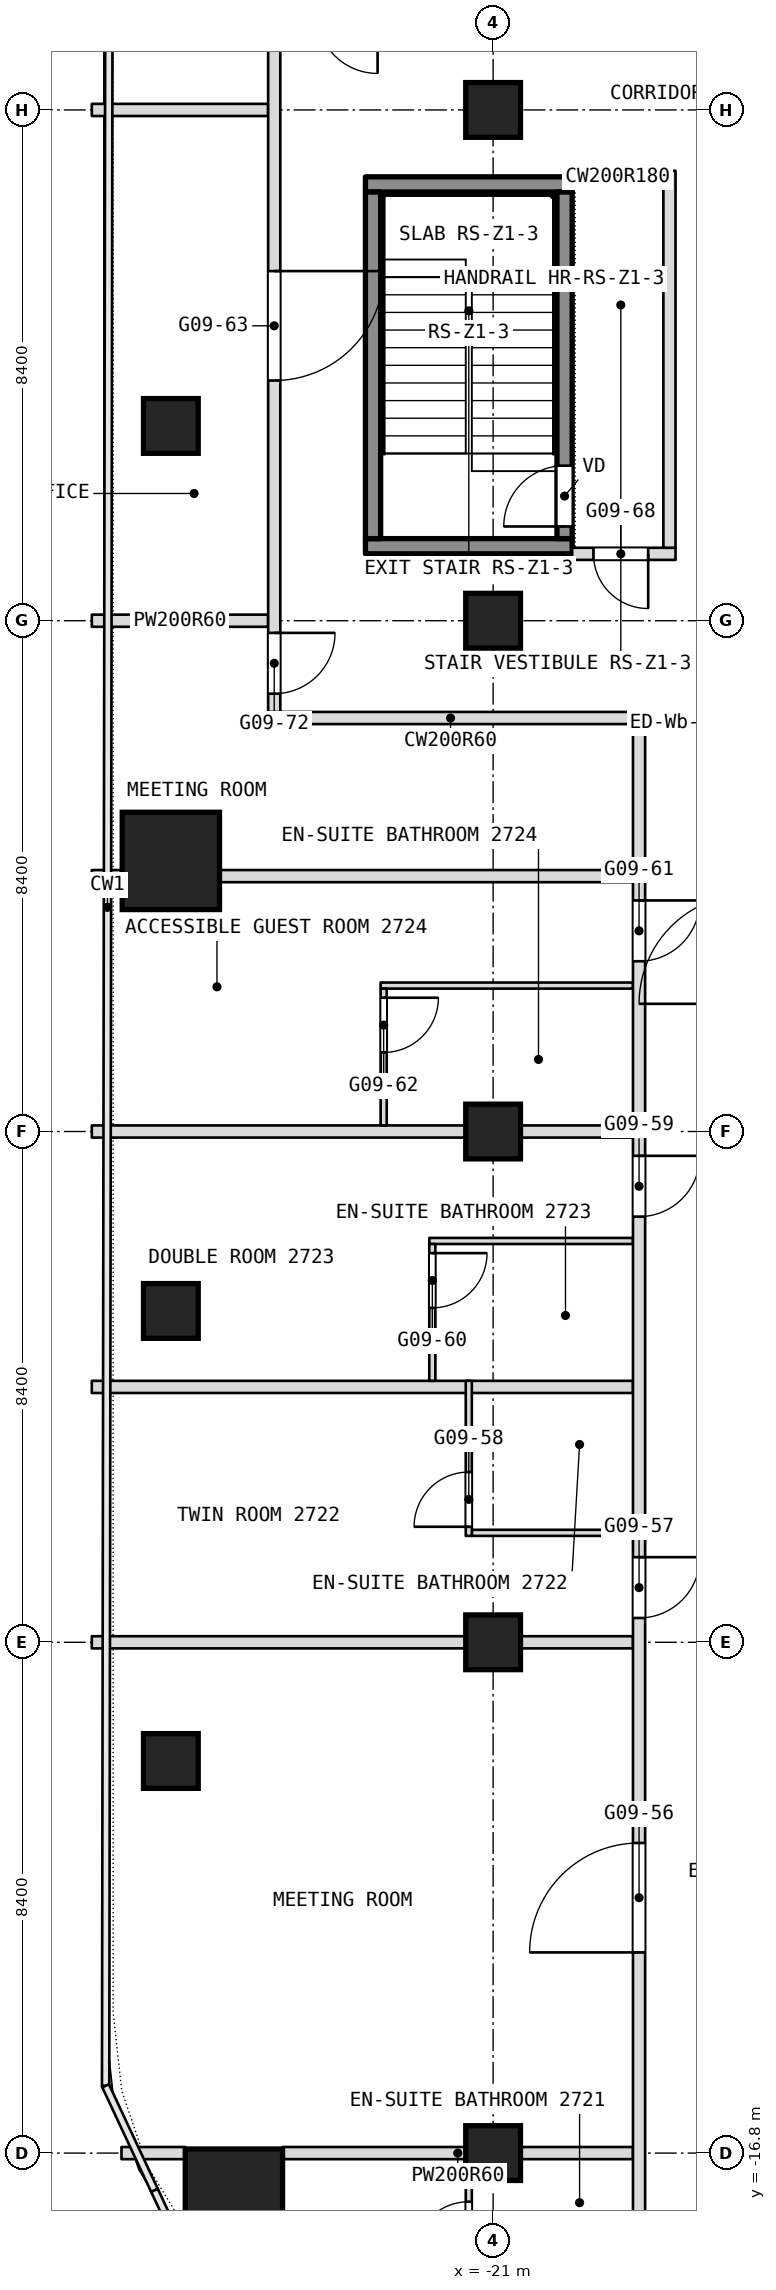
"""IFC4 building model, lengths in metres.
Left out: names, types, materials, properties, quantities, classifications, styles, units other than length and angle.
Written with IfcOpenShell. Run it as: python <this file> out.ifc"""

import sys

from ifc_helpers import new_model, si_unit, direction, frame, frame_2d, origin, origin_2d, place, context, subcontext, project, spatial, rectangle, extrude, element, fill, save


model = new_model("IFC4")
c1 = context("Model", 3, precision=1e-05, world=origin(), true_north=direction((0.0, 1.0)))
c2 = subcontext(c1, "Body", "Model", "MODEL_VIEW")
j1 = project(units=[si_unit("LENGTHUNIT", "METRE"), si_unit("PLANEANGLEUNIT", "RADIAN")], contexts=[c1])
p1 = place(None, origin())
s1 = spatial("IfcSite", under=j1, at=p1, CompositionType="ELEMENT")
p2 = place(p1, origin())
s2 = spatial("IfcBuilding", under=s1, at=p2, CompositionType="ELEMENT")
p3 = place(p2, frame((0.0, 0.0, 122.9)))
s3 = spatial("IfcBuildingStorey", under=s2, at=p3, CompositionType="ELEMENT", Elevation=122.9)
for number, where, z_axis, x_axis in (
    (1, (-25.263, -17.533, 0.0), (0.0, 0.0, 1.0), (1.0, 0.0, 0.0)),
    (2, (-26.3, 4.45, 0.0), (0.0, 0.0, 1.0), (1.0, 0.0, 0.0)),
):
    element("IfcColumn", number, at=place(p3, frame(where, z_axis=z_axis, x_axis=x_axis)), inside=s3, PredefinedType="COLUMN", context=c2, shape_type="SweptSolid", body=[
        extrude(rectangle(XDim=1.6, YDim=1.6, at=origin_2d()), origin(), (0.0, 0.0, 1.0), 3.6),
    ])
for number, where, z_axis, x_axis in (
    (3, (-21.0, -16.8, 0.0), (0.0, 0.0, 1.0), (1.0, 0.0, 0.0)),
    (4, (-21.0, -8.4, 0.0), (0.0, 0.0, 1.0), (1.0, 0.0, 0.0)),
    (5, (-21.0, 0.0, 0.0), (0.0, 0.0, 1.0), (1.0, 0.0, 0.0)),
    (6, (-21.0, 8.4, 0.0), (0.0, 0.0, 1.0), (1.0, 0.0, 0.0)),
    (7, (-21.0, 16.8, 0.0), (0.0, 0.0, 1.0), (1.0, 0.0, 0.0)),
    (8, (-26.3, -10.352, 0.0), (0.0, 0.0, 1.0), (1.0, 0.0, 0.0)),
    (9, (-26.3, -2.951, 0.0), (0.0, 0.0, 1.0), (1.0, 0.0, 0.0)),
    (10, (-26.3, 11.603, 0.0), (0.0, 0.0, 1.0), (1.0, 0.0, 0.0)),
):
    element("IfcColumn", number, at=place(p3, frame(where, z_axis=z_axis, x_axis=x_axis)), inside=s3, PredefinedType="COLUMN", context=c2, shape_type="SweptSolid", body=[
        extrude(rectangle(XDim=0.9, YDim=0.9, at=origin_2d()), origin(), (0.0, 0.0, 1.0), 3.6),
    ])
p4 = place(p3, frame((-27.112, -16.8, 0.0), z_axis=(0.0, 0.0, 1.0), x_axis=(1.0, 0.0, 0.0)))
e11 = element("IfcWall", 11, at=p4, inside=s3, PredefinedType="PARTITIONING", context=c2, shape_type="SweptSolid", body=[
    extrude(rectangle(XDim=1.049, YDim=0.2, at=frame_2d((0.524, 0.0))), origin(), (0.0, 0.0, 1.0), 3.34),
])
p5 = place(p3, frame((-24.463, -16.8, 0.0), z_axis=(0.0, 0.0, 1.0), x_axis=(1.0, 0.0, 0.0)))
e12 = element("IfcWall", 12, at=p5, inside=s3, PredefinedType="PARTITIONING", context=c2, shape_type="SweptSolid", body=[
    extrude(rectangle(XDim=5.763, YDim=0.2, at=frame_2d((2.881, 0.0))), origin(), (0.0, 0.0, 1.0), 2.89),
])
p6 = place(p3, frame((-27.6, -8.4, 0.0), z_axis=(0.0, 0.0, 1.0), x_axis=(1.0, 0.0, 0.0)))
e13 = element("IfcWall", 13, at=p6, inside=s3, PredefinedType="PARTITIONING", context=c2, shape_type="SweptSolid", body=[
    extrude(rectangle(XDim=8.9, YDim=0.2, at=frame_2d((4.45, 0.0))), origin(), (0.0, 0.0, 1.0), 2.89),
])
p7 = place(p3, frame((-21.35, -6.6, 0.0), z_axis=(0.0, 0.0, 1.0), x_axis=(1.0, 0.0, 0.0)))
e14 = element("IfcWall", 14, at=p7, inside=s3, PredefinedType="PARTITIONING", context=c2, shape_type="SweptSolid", body=[
    extrude(rectangle(XDim=2.65, YDim=0.1, at=frame_2d((1.325, 0.0))), origin(), (0.0, 0.0, 1.0), 3.34),
])
p8 = place(p3, frame((-27.6, -4.2, 0.0), z_axis=(0.0, 0.0, 1.0), x_axis=(1.0, 0.0, 0.0)))
e15 = element("IfcWall", 15, at=p8, inside=s3, PredefinedType="PARTITIONING", context=c2, shape_type="SweptSolid", body=[
    extrude(rectangle(XDim=8.9, YDim=0.2, at=frame_2d((4.45, 0.0))), origin(), (0.0, 0.0, 1.0), 3.34),
])
p9 = place(p3, frame((-22.05, -1.8, 0.0), z_axis=(0.0, 0.0, 1.0), x_axis=(1.0, 0.0, 0.0)))
e16 = element("IfcWall", 16, at=p9, inside=s3, PredefinedType="PARTITIONING", context=c2, shape_type="SweptSolid", body=[
    extrude(rectangle(XDim=3.35, YDim=0.1, at=frame_2d((1.675, 0.0))), origin(), (0.0, 0.0, 1.0), 3.34),
])
p10 = place(p3, frame((-27.6, 0.0, 0.0), z_axis=(0.0, 0.0, 1.0), x_axis=(1.0, 0.0, 0.0)))
e17 = element("IfcWall", 17, at=p10, inside=s3, PredefinedType="PARTITIONING", context=c2, shape_type="SweptSolid", body=[
    extrude(rectangle(XDim=8.9, YDim=0.2, at=frame_2d((4.45, 0.0))), origin(), (0.0, 0.0, 1.0), 2.89),
])
p11 = place(p3, frame((-22.85, 2.4, 0.0), z_axis=(0.0, 0.0, 1.0), x_axis=(1.0, 0.0, 0.0)))
e18 = element("IfcWall", 18, at=p11, inside=s3, PredefinedType="PARTITIONING", context=c2, shape_type="SweptSolid", body=[
    extrude(rectangle(XDim=4.15, YDim=0.1, at=frame_2d((2.075, 0.0))), origin(), (0.0, 0.0, 1.0), 3.34),
])
p12 = place(p3, frame((-27.6, 4.2, 0.0), z_axis=(0.0, 0.0, 1.0), x_axis=(1.0, 0.0, 0.0)))
e19 = element("IfcWall", 19, at=p12, inside=s3, PredefinedType="PARTITIONING", context=c2, shape_type="SweptSolid", body=[
    extrude(rectangle(XDim=0.5, YDim=0.2, at=frame_2d((0.25, 0.0))), origin(), (0.0, 0.0, 1.0), 3.34),
])
p13 = place(p3, frame((-25.5, 4.2, 0.0), z_axis=(0.0, 0.0, 1.0), x_axis=(1.0, 0.0, 0.0)))
e20 = element("IfcWall", 20, at=p13, inside=s3, PredefinedType="PARTITIONING", context=c2, shape_type="SweptSolid", body=[
    extrude(rectangle(XDim=6.8, YDim=0.2, at=frame_2d((3.4, 0.0))), origin(), (0.0, 0.0, 1.0), 3.34),
])
p14 = place(p3, frame((-24.7, 6.8, 0.0), z_axis=(0.0, 0.0, 1.0), x_axis=(1.0, 0.0, 0.0)))
e21 = element("IfcWall", 21, at=p14, inside=s3, PredefinedType="PARTITIONING", context=c2, shape_type="SweptSolid", body=[
    extrude(rectangle(XDim=6.0, YDim=0.2, at=frame_2d((3.0, 0.0))), origin(), (0.0, 0.0, 1.0), 3.34),
])
p15 = place(p3, frame((-27.6, 8.4, 0.0), z_axis=(0.0, 0.0, 1.0), x_axis=(1.0, 0.0, 0.0)))
e22 = element("IfcWall", 22, at=p15, inside=s3, PredefinedType="PARTITIONING", context=c2, shape_type="SweptSolid", body=[
    extrude(rectangle(XDim=2.9, YDim=0.2, at=frame_2d((1.45, 0.0))), origin(), (0.0, 0.0, 1.0), 2.89),
])
p16 = place(p3, frame((-19.7, 9.5, 0.0), z_axis=(0.0, 0.0, 1.0), x_axis=(1.0, 0.0, 0.0)))
e23 = element("IfcWall", 23, at=p16, inside=s3, PredefinedType="PARTITIONING", context=c2, shape_type="SweptSolid", body=[
    extrude(rectangle(XDim=1.7, YDim=0.2, at=frame_2d((0.85, 0.0))), origin(), (0.0, 0.0, 1.0), 3.34),
])
p17 = place(p16, frame((0.35, 0.0, 0.0)))
e24 = element("IfcOpeningElement", 24, at=p17, cuts=e23, PredefinedType="OPENING", context=c2, shape_type="SweptSolid", body=[
    extrude(rectangle(XDim=0.9, YDim=2.1, at=frame_2d((0.45, 1.05))), frame((0.0, 0.1, 0.0), z_axis=(0.0, -1.0, 0.0), x_axis=(1.0, 0.0, 0.0)), (0.0, 0.0, 1.0), 0.2),
])
p18 = place(p3, frame((-19.7, 15.7, 0.0), z_axis=(0.0, 0.0, 1.0), x_axis=(1.0, 0.0, 0.0)))
e25 = element("IfcWall", 25, at=p18, inside=s3, PredefinedType="PARTITIONING", context=c2, shape_type="SweptSolid", body=[
    extrude(rectangle(XDim=1.5, YDim=0.2, at=frame_2d((0.75, 0.0))), origin(), (0.0, 0.0, 1.0), 3.34),
])
p19 = place(p3, frame((-27.6, 16.8, 0.0), z_axis=(0.0, 0.0, 1.0), x_axis=(1.0, 0.0, 0.0)))
e26 = element("IfcWall", 26, at=p19, inside=s3, PredefinedType="PARTITIONING", context=c2, shape_type="SweptSolid", body=[
    extrude(rectangle(XDim=2.9, YDim=0.2, at=frame_2d((1.45, 0.0))), origin(), (0.0, 0.0, 1.0), 2.89),
])
p20 = place(p3, frame((-18.1, 9.6, 0.0), z_axis=(0.0, 0.0, 1.0), x_axis=(0.0, 1.0, 0.0)))
e27 = element("IfcWall", 27, at=p20, inside=s3, PredefinedType="PARTITIONING", context=c2, shape_type="SweptSolid", body=[
    extrude(rectangle(XDim=6.2, YDim=0.2, at=frame_2d((3.1, 0.0))), origin(), (0.0, 0.0, 1.0), 3.34),
])
p21 = place(p3, frame((-18.6, -21.708, 0.0), z_axis=(0.0, 0.0, 1.0), x_axis=(0.0, 1.0, 0.0)))
e28 = element("IfcWall", 28, at=p21, inside=s3, PredefinedType="PARTITIONING", context=c2, shape_type="SweptSolid", body=[
    extrude(rectangle(XDim=28.608, YDim=0.2, at=frame_2d((14.304, 0.0))), origin(), (0.0, 0.0, 1.0), 3.34),
])
p22 = place(p21, frame((2.054, 0.0, 0.0)))
e29 = element("IfcOpeningElement", 29, at=p22, cuts=e28, PredefinedType="OPENING", context=c2, shape_type="SweptSolid", body=[
    extrude(rectangle(XDim=0.9, YDim=2.1, at=frame_2d((0.45, 1.05))), frame((0.0, 0.1, 0.0), z_axis=(0.0, -1.0, 0.0), x_axis=(1.0, 0.0, 0.0)), (0.0, 0.0, 1.0), 0.2),
])
p23 = place(p21, frame((8.208, 0.0, 0.0)))
e30 = element("IfcOpeningElement", 30, at=p23, cuts=e28, PredefinedType="OPENING", context=c2, shape_type="SweptSolid", body=[
    extrude(rectangle(XDim=1.8, YDim=2.1, at=frame_2d((0.9, 1.05))), frame((0.0, 0.1, 0.0), z_axis=(0.0, -1.0, 0.0), x_axis=(1.0, 0.0, 0.0)), (0.0, 0.0, 1.0), 0.2),
])
p24 = place(p21, frame((13.708, 0.0, 0.0)))
e31 = element("IfcOpeningElement", 31, at=p24, cuts=e28, PredefinedType="OPENING", context=c2, shape_type="SweptSolid", body=[
    extrude(rectangle(XDim=1.0, YDim=2.1, at=frame_2d((0.5, 1.05))), frame((0.0, 0.1, 0.0), z_axis=(0.0, -1.0, 0.0), x_axis=(1.0, 0.0, 0.0)), (0.0, 0.0, 1.0), 0.2),
])
p25 = place(p21, frame((20.308, 0.0, 0.0)))
e32 = element("IfcOpeningElement", 32, at=p25, cuts=e28, PredefinedType="OPENING", context=c2, shape_type="SweptSolid", body=[
    extrude(rectangle(XDim=1.0, YDim=2.1, at=frame_2d((0.5, 1.05))), frame((0.0, 0.1, 0.0), z_axis=(0.0, -1.0, 0.0), x_axis=(1.0, 0.0, 0.0)), (0.0, 0.0, 1.0), 0.2),
])
p26 = place(p21, frame((24.508, 0.0, 0.0)))
e33 = element("IfcOpeningElement", 33, at=p26, cuts=e28, PredefinedType="OPENING", context=c2, shape_type="SweptSolid", body=[
    extrude(rectangle(XDim=1.0, YDim=2.1, at=frame_2d((0.5, 1.05))), frame((0.0, 0.1, 0.0), z_axis=(0.0, -1.0, 0.0), x_axis=(1.0, 0.0, 0.0)), (0.0, 0.0, 1.0), 0.2),
])
p27 = place(p3, frame((-21.4, -18.65, 0.0), z_axis=(0.0, 0.0, 1.0), x_axis=(0.0, 1.0, 0.0)))
e34 = element("IfcWall", 34, at=p27, inside=s3, PredefinedType="PARTITIONING", context=c2, shape_type="SweptSolid", body=[
    extrude(rectangle(XDim=1.95, YDim=0.1, at=frame_2d((0.975, 0.0))), origin(), (0.0, 0.0, 1.0), 3.34),
])
p28 = place(p27, frame((0.15, 0.0, 0.0)))
e35 = element("IfcOpeningElement", 35, at=p28, cuts=e34, PredefinedType="OPENING", context=c2, shape_type="SweptSolid", body=[
    extrude(rectangle(XDim=0.9, YDim=2.1, at=frame_2d((0.45, 1.05))), frame((0.0, 0.05, 0.0), z_axis=(0.0, -1.0, 0.0), x_axis=(1.0, 0.0, 0.0)), (0.0, 0.0, 1.0), 0.1),
])
p29 = place(p3, frame((-21.4, -6.65, 0.0), z_axis=(0.0, 0.0, 1.0), x_axis=(0.0, 1.0, 0.0)))
e36 = element("IfcWall", 36, at=p29, inside=s3, PredefinedType="PARTITIONING", context=c2, shape_type="SweptSolid", body=[
    extrude(rectangle(XDim=2.55, YDim=0.1, at=frame_2d((1.275, 0.0))), origin(), (0.0, 0.0, 1.0), 3.34),
])
p30 = place(p29, frame((0.15, 0.0, 0.0)))
e37 = element("IfcOpeningElement", 37, at=p30, cuts=e36, PredefinedType="OPENING", context=c2, shape_type="SweptSolid", body=[
    extrude(rectangle(XDim=0.9, YDim=2.1, at=frame_2d((0.45, 1.05))), frame((0.0, 0.05, 0.0), z_axis=(0.0, -1.0, 0.0), x_axis=(1.0, 0.0, 0.0)), (0.0, 0.0, 1.0), 0.1),
])
p31 = place(p3, frame((-22.0, -4.1, 0.0), z_axis=(0.0, 0.0, 1.0), x_axis=(0.0, 1.0, 0.0)))
e38 = element("IfcWall", 38, at=p31, inside=s3, PredefinedType="PARTITIONING", context=c2, shape_type="SweptSolid", body=[
    extrude(rectangle(XDim=2.25, YDim=0.1, at=frame_2d((1.125, 0.0))), origin(), (0.0, 0.0, 1.0), 3.34),
])
p32 = place(p31, frame((1.2, 0.0, 0.0)))
e39 = element("IfcOpeningElement", 39, at=p32, cuts=e38, PredefinedType="OPENING", context=c2, shape_type="SweptSolid", body=[
    extrude(rectangle(XDim=0.9, YDim=2.1, at=frame_2d((0.45, 1.05))), frame((0.0, 0.05, 0.0), z_axis=(0.0, -1.0, 0.0), x_axis=(1.0, 0.0, 0.0)), (0.0, 0.0, 1.0), 0.1),
])
p33 = place(p3, frame((-22.8, 0.1, 0.0), z_axis=(0.0, 0.0, 1.0), x_axis=(0.0, 1.0, 0.0)))
e40 = element("IfcWall", 40, at=p33, inside=s3, PredefinedType="PARTITIONING", context=c2, shape_type="SweptSolid", body=[
    extrude(rectangle(XDim=2.25, YDim=0.1, at=frame_2d((1.125, 0.0))), origin(), (0.0, 0.0, 1.0), 3.34),
])
p34 = place(p33, frame((1.2, 0.0, 0.0)))
e41 = element("IfcOpeningElement", 41, at=p34, cuts=e40, PredefinedType="OPENING", context=c2, shape_type="SweptSolid", body=[
    extrude(rectangle(XDim=0.9, YDim=2.1, at=frame_2d((0.45, 1.05))), frame((0.0, 0.05, 0.0), z_axis=(0.0, -1.0, 0.0), x_axis=(1.0, 0.0, 0.0)), (0.0, 0.0, 1.0), 0.1),
])
p35 = place(p3, frame((-24.6, 6.9, 0.0), z_axis=(0.0, 0.0, 1.0), x_axis=(0.0, 1.0, 0.0)))
e42 = element("IfcWall", 42, at=p35, inside=s3, PredefinedType="PARTITIONING", context=c2, shape_type="SweptSolid", body=[
    extrude(rectangle(XDim=11.6, YDim=0.2, at=frame_2d((5.8, 0.0))), origin(), (0.0, 0.0, 1.0), 3.34),
])
p36 = place(p35, frame((5.45, 0.0, 0.0)))
e43 = element("IfcOpeningElement", 43, at=p36, cuts=e42, PredefinedType="OPENING", context=c2, shape_type="SweptSolid", body=[
    extrude(rectangle(XDim=1.8, YDim=2.1, at=frame_2d((0.9, 1.05))), frame((0.0, 0.1, 0.0), z_axis=(0.0, -1.0, 0.0), x_axis=(1.0, 0.0, 0.0)), (0.0, 0.0, 1.0), 0.2),
])
p37 = place(p35, frame((0.3, 0.0, 0.0)))
e44 = element("IfcOpeningElement", 44, at=p37, cuts=e42, PredefinedType="OPENING", context=c2, shape_type="SweptSolid", body=[
    extrude(rectangle(XDim=1.0, YDim=2.1, at=frame_2d((0.5, 1.05))), frame((0.0, 0.1, 0.0), z_axis=(0.0, -1.0, 0.0), x_axis=(1.0, 0.0, 0.0)), (0.0, 0.0, 1.0), 0.2),
])
for number, where, z_axis, x_axis in (
    (45, (-23.1, 9.625, 0.1), (0.0, 0.0, 1.0), (1.0, 0.0, 0.0)),
    (46, (-23.1, 15.575, 0.1), (0.0, 0.0, 1.0), (1.0, 0.0, 0.0)),
):
    element("IfcWall", number, at=place(p3, frame(where, z_axis=z_axis, x_axis=x_axis)), inside=s3, PredefinedType="SHEAR", context=c2, shape_type="SweptSolid", body=[
        extrude(rectangle(XDim=3.4, YDim=0.25, at=frame_2d((1.7, 0.0))), origin(), (0.0, 0.0, 1.0), 3.6),
    ])
p38 = place(p3, frame((-22.975, 9.75, 0.1), z_axis=(0.0, 0.0, 1.0), x_axis=(0.0, 1.0, 0.0)))
e47 = element("IfcWall", 47, at=p38, inside=s3, PredefinedType="SHEAR", context=c2, shape_type="SweptSolid", body=[
    extrude(rectangle(XDim=5.7, YDim=0.25, at=frame_2d((2.85, 0.0))), origin(), (0.0, 0.0, 1.0), 3.6),
])
p39 = place(p3, frame((-19.825, 9.75, 0.1), z_axis=(0.0, 0.0, 1.0), x_axis=(0.0, 1.0, 0.0)))
e48 = element("IfcWall", 48, at=p39, inside=s3, PredefinedType="SHEAR", context=c2, shape_type="SweptSolid", body=[
    extrude(rectangle(XDim=5.7, YDim=0.25, at=frame_2d((2.85, 0.0))), origin(), (0.0, 0.0, 1.0), 3.6),
])
p40 = place(p39, frame((0.2, 0.0, 0.0)))
e49 = element("IfcOpeningElement", 49, at=p40, cuts=e48, PredefinedType="OPENING", context=c2, shape_type="SweptSolid", body=[
    extrude(rectangle(XDim=1.0, YDim=2.1, at=frame_2d((0.5, 1.05))), frame((0.0, 0.125, 0.0), z_axis=(0.0, -1.0, 0.0), x_axis=(1.0, 0.0, 0.0)), (0.0, 0.0, 1.0), 0.25),
])
p41 = place(p17, origin())
e50 = element("IfcDoor", 50, at=p41, inside=s3, OperationType="SINGLE_SWING_RIGHT", PredefinedType="DOOR", context=c2, shape_type="SweptSolid", body=[
    extrude(rectangle(XDim=0.9, YDim=2.1, at=frame_2d((0.45, 1.05))), frame((0.0, 0.025, 0.0), z_axis=(0.0, -1.0, 0.0), x_axis=(1.0, 0.0, 0.0)), (0.0, 0.0, 1.0), 0.05),
])
fill(e24, e50)
p42 = place(p23, origin())
e51 = element("IfcDoor", 51, at=p42, inside=s3, OperationType="DOUBLE_DOOR_SINGLE_SWING", PredefinedType="DOOR", context=c2, shape_type="SweptSolid", body=[
    extrude(rectangle(XDim=1.8, YDim=2.1, at=frame_2d((0.9, 1.05))), frame((0.0, 0.025, 0.0), z_axis=(0.0, -1.0, 0.0), x_axis=(1.0, 0.0, 0.0)), (0.0, 0.0, 1.0), 0.05),
])
fill(e30, e51)
p43 = place(p24, origin())
e52 = element("IfcDoor", 52, at=p43, inside=s3, OperationType="SINGLE_SWING_RIGHT", PredefinedType="DOOR", context=c2, shape_type="SweptSolid", body=[
    extrude(rectangle(XDim=1.0, YDim=2.1, at=frame_2d((0.5, 1.05))), frame((0.0, 0.025, 0.0), z_axis=(0.0, -1.0, 0.0), x_axis=(1.0, 0.0, 0.0)), (0.0, 0.0, 1.0), 0.05),
])
fill(e31, e52)
p44 = place(p25, origin())
e53 = element("IfcDoor", 53, at=p44, inside=s3, OperationType="SINGLE_SWING_RIGHT", PredefinedType="DOOR", context=c2, shape_type="SweptSolid", body=[
    extrude(rectangle(XDim=1.0, YDim=2.1, at=frame_2d((0.5, 1.05))), frame((0.0, 0.025, 0.0), z_axis=(0.0, -1.0, 0.0), x_axis=(1.0, 0.0, 0.0)), (0.0, 0.0, 1.0), 0.05),
])
fill(e32, e53)
p45 = place(p26, origin())
e54 = element("IfcDoor", 54, at=p45, inside=s3, OperationType="SINGLE_SWING_RIGHT", PredefinedType="DOOR", context=c2, shape_type="SweptSolid", body=[
    extrude(rectangle(XDim=1.0, YDim=2.1, at=frame_2d((0.5, 1.05))), frame((0.0, 0.025, 0.0), z_axis=(0.0, -1.0, 0.0), x_axis=(1.0, 0.0, 0.0)), (0.0, 0.0, 1.0), 0.05),
])
fill(e33, e54)
p46 = place(p28, origin())
e55 = element("IfcDoor", 55, at=p46, inside=s3, OperationType="SINGLE_SWING_RIGHT", PredefinedType="DOOR", context=c2, shape_type="SweptSolid", body=[
    extrude(rectangle(XDim=0.9, YDim=2.1, at=frame_2d((0.45, 1.05))), frame((0.0, 0.025, 0.0), z_axis=(0.0, -1.0, 0.0), x_axis=(1.0, 0.0, 0.0)), (0.0, 0.0, 1.0), 0.05),
])
fill(e35, e55)
p47 = place(p30, origin())
e56 = element("IfcDoor", 56, at=p47, inside=s3, OperationType="SINGLE_SWING_RIGHT", PredefinedType="DOOR", context=c2, shape_type="SweptSolid", body=[
    extrude(rectangle(XDim=0.9, YDim=2.1, at=frame_2d((0.45, 1.05))), frame((0.0, 0.025, 0.0), z_axis=(0.0, -1.0, 0.0), x_axis=(1.0, 0.0, 0.0)), (0.0, 0.0, 1.0), 0.05),
])
fill(e37, e56)
p48 = place(p32, origin())
e57 = element("IfcDoor", 57, at=p48, inside=s3, OperationType="SINGLE_SWING_LEFT", PredefinedType="DOOR", context=c2, shape_type="SweptSolid", body=[
    extrude(rectangle(XDim=0.9, YDim=2.1, at=frame_2d((0.45, 1.05))), frame((0.0, 0.025, 0.0), z_axis=(0.0, -1.0, 0.0), x_axis=(1.0, 0.0, 0.0)), (0.0, 0.0, 1.0), 0.05),
])
fill(e39, e57)
p49 = place(p34, origin())
e58 = element("IfcDoor", 58, at=p49, inside=s3, OperationType="SINGLE_SWING_LEFT", PredefinedType="DOOR", context=c2, shape_type="SweptSolid", body=[
    extrude(rectangle(XDim=0.9, YDim=2.1, at=frame_2d((0.45, 1.05))), frame((0.0, 0.025, 0.0), z_axis=(0.0, -1.0, 0.0), x_axis=(1.0, 0.0, 0.0)), (0.0, 0.0, 1.0), 0.05),
])
fill(e41, e58)
p50 = place(p36, origin())
e59 = element("IfcDoor", 59, at=p50, inside=s3, OperationType="DOUBLE_DOOR_SINGLE_SWING", PredefinedType="DOOR", context=c2, shape_type="SweptSolid", body=[
    extrude(rectangle(XDim=1.8, YDim=2.1, at=frame_2d((0.9, 1.05))), frame((0.0, 0.025, 0.0), z_axis=(0.0, -1.0, 0.0), x_axis=(1.0, 0.0, 0.0)), (0.0, 0.0, 1.0), 0.05),
])
fill(e43, e59)
p51 = place(p37, origin())
e60 = element("IfcDoor", 60, at=p51, inside=s3, OperationType="SINGLE_SWING_LEFT", PredefinedType="DOOR", context=c2, shape_type="SweptSolid", body=[
    extrude(rectangle(XDim=1.0, YDim=2.1, at=frame_2d((0.5, 1.05))), frame((0.0, 0.025, 0.0), z_axis=(0.0, -1.0, 0.0), x_axis=(1.0, 0.0, 0.0)), (0.0, 0.0, 1.0), 0.05),
])
fill(e44, e60)
p52 = place(p40, origin())
e61 = element("IfcDoor", 61, at=p52, inside=s3, OperationType="SINGLE_SWING_LEFT", PredefinedType="DOOR", context=c2, shape_type="SweptSolid", body=[
    extrude(rectangle(XDim=1.0, YDim=2.1, at=frame_2d((0.5, 1.05))), frame((0.0, 0.025, 0.0), z_axis=(0.0, -1.0, 0.0), x_axis=(1.0, 0.0, 0.0)), (0.0, 0.0, 1.0), 0.05),
])
fill(e49, e61)
save(model, sys.argv[1])
